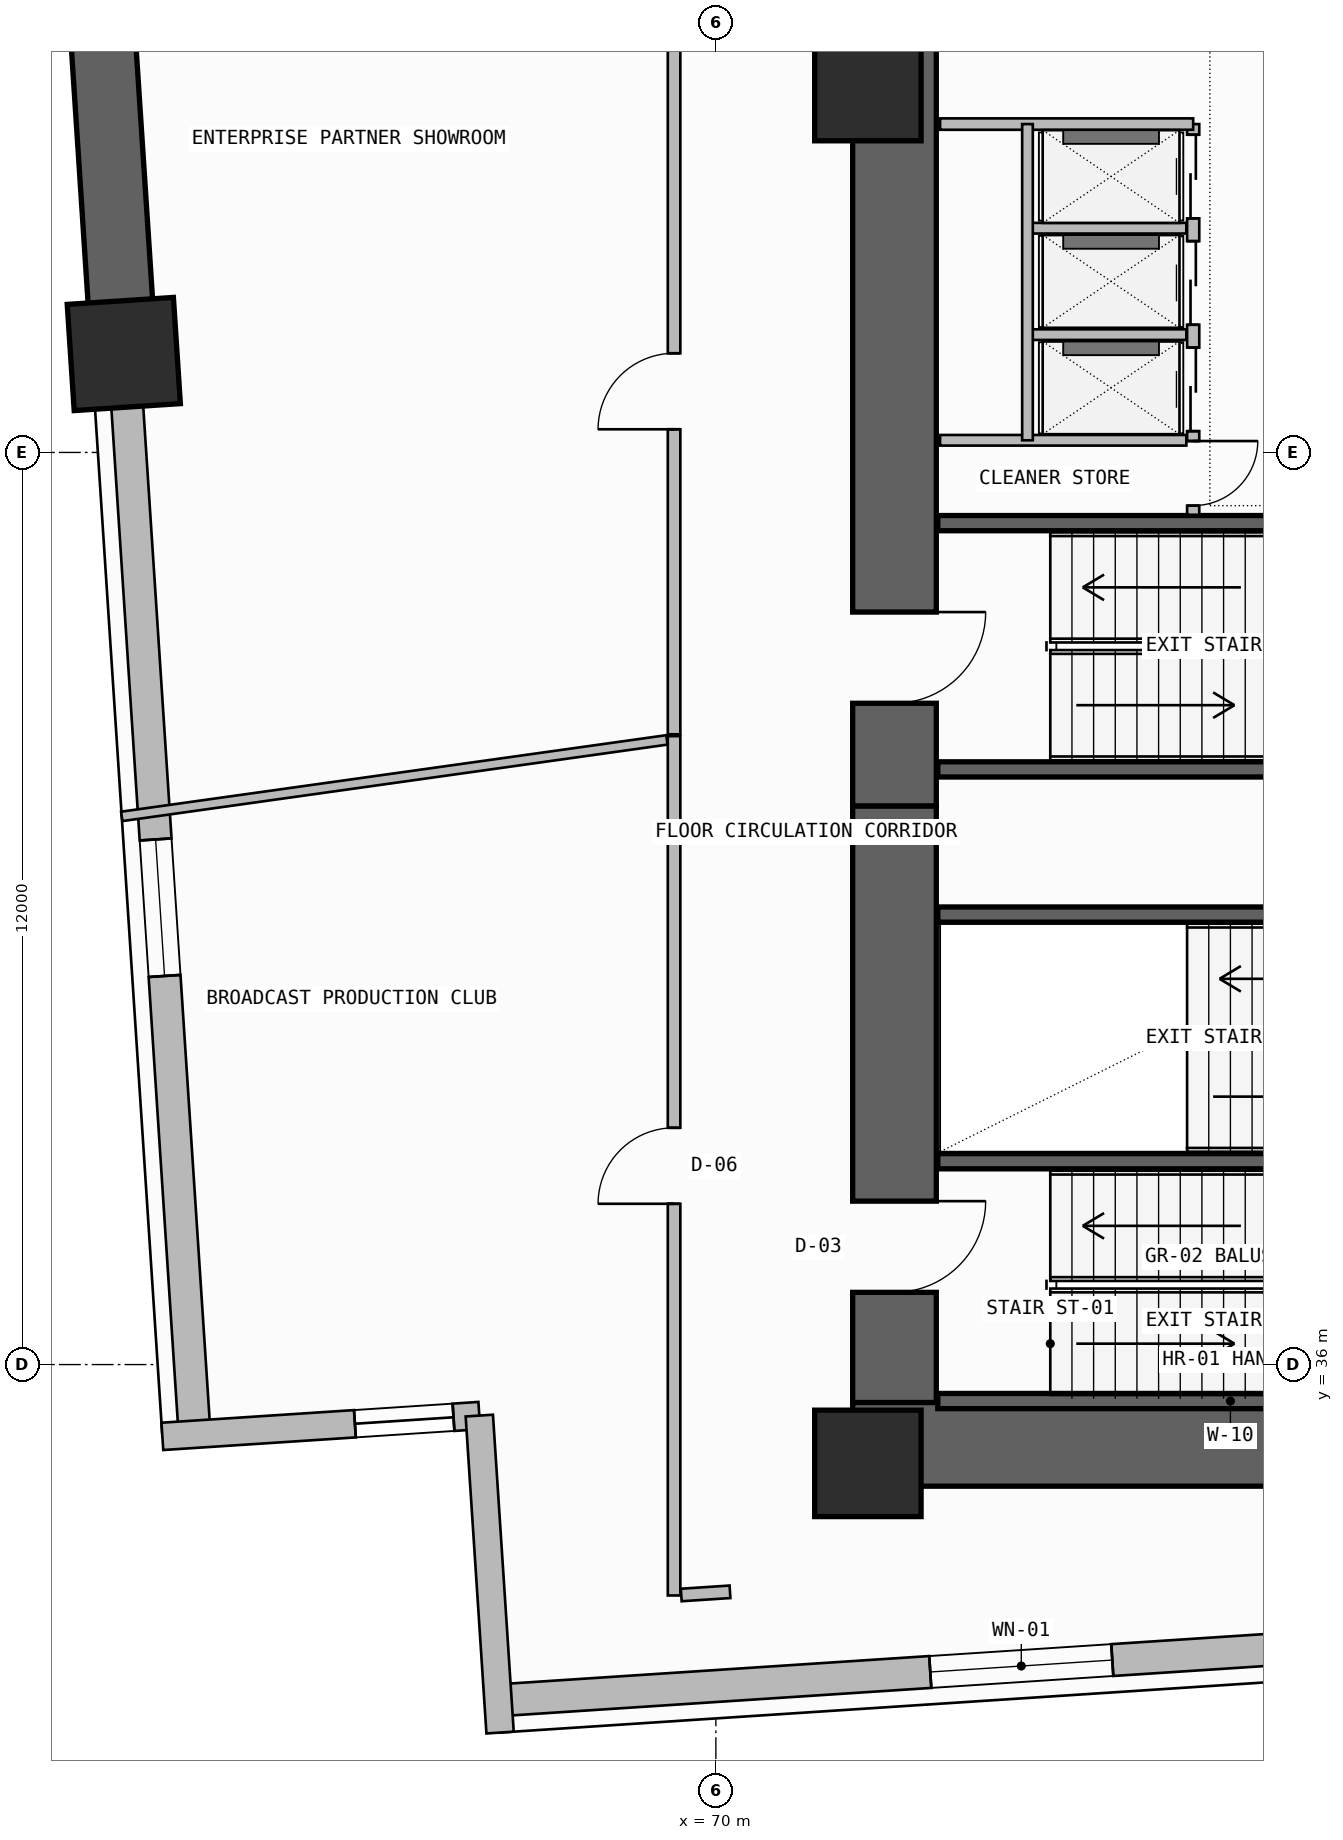
"""IFC4 building model, lengths in metres.
Left out: names, types, materials, properties, quantities, classifications, styles, units other than length and angle.
Written with IfcOpenShell. Run it as: python <this file> out.ifc"""

import sys

from ifc_helpers import new_model, si_unit, direction, frame, frame_2d, origin, origin_2d, place, context, subcontext, project, spatial, rectangle, extrude, element, fill, save


model = new_model("IFC4")
c1 = context("Model", 3, precision=1e-05, world=origin(), true_north=direction((0.0, 1.0)))
c2 = subcontext(c1, "Body", "Model", "MODEL_VIEW")
j1 = project(units=[si_unit("LENGTHUNIT", "METRE"), si_unit("PLANEANGLEUNIT", "RADIAN")], contexts=[c1])
p1 = place(None, origin())
s1 = spatial("IfcSite", under=j1, at=p1, CompositionType="ELEMENT")
p2 = place(p1, origin())
s2 = spatial("IfcBuilding", under=s1, at=p2, CompositionType="ELEMENT")
p3 = place(p2, frame((0.0, 0.0, 74.1)))
s3 = spatial("IfcBuildingStorey", under=s2, at=p3, CompositionType="ELEMENT", Elevation=74.1)
p4 = place(p3, frame((72.35, 35.5, -0.26), z_axis=(0.0, 0.0, 1.0), x_axis=(0.0, 1.0, 0.0)))
e1 = element("IfcWall", 1, at=p4, inside=s3, PredefinedType="SHEAR", context=c2, shape_type="SweptSolid", body=[
    extrude(rectangle(XDim=7.85, YDim=1.1, at=frame_2d((3.925, 0.0))), origin(), (0.0, 0.0, 1.0), 3.6),
])
p5 = place(p4, frame((1.45, 0.0, 0.26)))
e2 = element("IfcOpeningElement", 2, at=p5, cuts=e1, PredefinedType="OPENING", context=c2, shape_type="SweptSolid", body=[
    extrude(rectangle(XDim=1.2, YDim=2.2, at=frame_2d((0.6, 1.1))), frame((0.0, 0.56, 0.0), z_axis=(0.0, -1.0, 0.0), x_axis=(1.0, 0.0, 0.0)), (0.0, 0.0, 1.0), 1.12),
])
p6 = place(p3, frame((71.8, 34.95, -0.26), z_axis=(0.0, 0.0, 1.0), x_axis=(1.0, 0.0, 0.0)))
e3 = element("IfcWall", 3, at=p6, inside=s3, PredefinedType="SHEAR", context=c2, shape_type="SweptSolid", body=[
    extrude(rectangle(XDim=14.3, YDim=1.1, at=frame_2d((7.15, 0.0))), origin(), (0.0, 0.0, 1.0), 3.6),
])
p7 = place(p3, frame((72.35, 43.35, -0.26), z_axis=(0.0, 0.0, 1.0), x_axis=(0.0, 1.0, 0.0)))
e4 = element("IfcWall", 4, at=p7, inside=s3, PredefinedType="SHEAR", context=c2, shape_type="SweptSolid", body=[
    extrude(rectangle(XDim=12.7, YDim=1.1, at=frame_2d((6.35, 0.0))), origin(), (0.0, 0.0, 1.0), 3.6),
])
p8 = place(p7, frame((1.35, 0.0, 0.26)))
e5 = element("IfcOpeningElement", 5, at=p8, cuts=e4, PredefinedType="OPENING", context=c2, shape_type="SweptSolid", body=[
    extrude(rectangle(XDim=1.2, YDim=2.2, at=frame_2d((0.6, 1.1))), frame((0.0, 0.56, 0.0), z_axis=(0.0, -1.0, 0.0), x_axis=(1.0, 0.0, 0.0)), (0.0, 0.0, 1.0), 1.12),
])
for number, where, z_axis, x_axis in (
    (6, (72.0, 34.7, 0.0), (0.0, 0.0, 1.0), (1.0, 0.0, 0.0)),
    (7, (72.0, 52.8, 0.0), (0.0, 0.0, 1.0), (1.0, 0.0, 0.0)),
    (8, (62.21, 49.295, 0.0), (0.0, 0.0, 1.0), (-0.065, 0.998, 0.0)),
):
    element("IfcColumn", number, at=place(p3, frame(where, z_axis=z_axis, x_axis=x_axis)), inside=s3, PredefinedType="COLUMN", context=c2, shape_type="SweptSolid", body=[
        extrude(rectangle(XDim=1.4, YDim=1.4, at=origin_2d()), origin(), (0.0, 0.0, 1.0), 3.6),
    ])
p9 = place(p3, frame((67.133, 31.583, 0.0), z_axis=(0.0, 0.0, 1.0), x_axis=(0.997859040617, 0.065401338356, 0.0)))
e9 = element("IfcWall", 9, at=p9, inside=s3, PredefinedType="SOLIDWALL", context=c2, shape_type="SweptSolid", body=[
    extrude(rectangle(XDim=17.862, YDim=0.42, at=frame_2d((8.931, 0.0))), origin(), (0.0, 0.0, 1.0), 2.325),
])
p10 = place(p9, frame((5.7, 0.0, 1.2)))
e10 = element("IfcOpeningElement", 10, at=p10, cuts=e9, PredefinedType="OPENING", context=c2, shape_type="SweptSolid", body=[
    extrude(rectangle(XDim=2.4, YDim=0.9, at=frame_2d((1.2, 0.45))), frame((0.0, 0.22, 0.0), z_axis=(0.0, -1.0, 0.0), x_axis=(1.0, 0.0, 0.0)), (0.0, 0.0, 1.0), 0.44),
])
p11 = place(p3, frame((60.785, 71.031, -0.26), z_axis=(0.0, 0.0, 1.0), x_axis=(0.065409824833, -0.997858484363, 0.0)))
e11 = element("IfcWall", 11, at=p11, inside=s3, PredefinedType="SHEAR", context=c2, shape_type="SweptSolid", body=[
    extrude(rectangle(XDim=21.783, YDim=0.85, at=frame_2d((10.891, 0.0))), origin(), (0.0, 0.0, 1.0), 3.6),
])
p12 = place(p11, frame((2.2, 0.0, 1.2)))
e12 = element("IfcOpeningElement", 12, at=p12, cuts=e11, PredefinedType="OPENING", context=c2, shape_type="SweptSolid", body=[
    extrude(rectangle(XDim=1.8, YDim=0.9, at=frame_2d((0.9, 0.45))), frame((0.0, 0.435, 0.0), z_axis=(0.0, -1.0, 0.0), x_axis=(1.0, 0.0, 0.0)), (0.0, 0.0, 1.0), 0.87),
])
p13 = place(p3, frame((62.21, 49.295, 0.0), z_axis=(0.0, 0.0, 1.0), x_axis=(0.065396027757, -0.997859388668, 0.0)))
e13 = element("IfcWall", 13, at=p13, inside=s3, PredefinedType="SOLIDWALL", context=c2, shape_type="SweptSolid", body=[
    extrude(rectangle(XDim=14.242, YDim=0.42, at=frame_2d((7.121, 0.0))), origin(), (0.0, 0.0, 1.0), 2.325),
])
p14 = place(p13, frame((6.4, 0.0, 1.2)))
e14 = element("IfcOpeningElement", 14, at=p14, cuts=e13, PredefinedType="OPENING", context=c2, shape_type="SweptSolid", body=[
    extrude(rectangle(XDim=1.8, YDim=0.9, at=frame_2d((0.9, 0.45))), frame((0.0, 0.22, 0.0), z_axis=(0.0, -1.0, 0.0), x_axis=(1.0, 0.0, 0.0)), (0.0, 0.0, 1.0), 0.44),
])
p15 = place(p3, frame((62.718, 35.055, 0.0), z_axis=(0.0, 0.0, 1.0), x_axis=(0.997860761953, 0.065375069826, 0.0)))
e15 = element("IfcWall", 15, at=p15, inside=s3, PredefinedType="SOLIDWALL", context=c2, shape_type="SweptSolid", body=[
    extrude(rectangle(XDim=4.179, YDim=0.36, at=frame_2d((2.089, 0.0))), origin(), (0.0, 0.0, 1.0), 3.34),
])
p16 = place(p15, frame((2.539, 0.0, 0.45)))
e16 = element("IfcOpeningElement", 16, at=p16, cuts=e15, PredefinedType="OPENING", context=c2, shape_type="SweptSolid", body=[
    extrude(rectangle(XDim=1.3, YDim=2.4, at=frame_2d((0.65, 1.2))), frame((0.0, 0.19, 0.0), z_axis=(0.0, -1.0, 0.0), x_axis=(1.0, 0.0, 0.0)), (0.0, 0.0, 1.0), 0.38),
])
p17 = place(p3, frame((66.887, 35.329, 0.0), z_axis=(0.0, 0.0, 1.0), x_axis=(0.065433242561, -0.99785694905, 0.0)))
e17 = element("IfcWall", 17, at=p17, inside=s3, PredefinedType="SOLIDWALL", context=c2, shape_type="SweptSolid", body=[
    extrude(rectangle(XDim=4.179, YDim=0.36, at=frame_2d((2.089, 0.0))), origin(), (0.0, 0.0, 1.0), 3.34),
])
for number, where, z_axis, x_axis in (
    (18, (72.92, 35.52, -0.26), (0.0, 0.0, 1.0), (1.0, 0.0, 0.0)),
    (19, (72.92, 38.675, -0.26), (0.0, 0.0, 1.0), (1.0, 0.0, 0.0)),
):
    element("IfcWall", number, at=place(p3, frame(where, z_axis=z_axis, x_axis=x_axis)), inside=s3, PredefinedType="SOLIDWALL", context=c2, shape_type="SweptSolid", body=[
        extrude(rectangle(XDim=7.7, YDim=0.2, at=frame_2d((3.85, 0.0))), origin(), (0.0, 0.0, 1.0), 3.6),
    ])
p18 = place(p3, frame((72.92, 41.92, -0.26), z_axis=(0.0, 0.0, 1.0), x_axis=(1.0, 0.0, 0.0)))
e20 = element("IfcWall", 20, at=p18, inside=s3, PredefinedType="SOLIDWALL", context=c2, shape_type="SweptSolid", body=[
    extrude(rectangle(XDim=7.58, YDim=0.2, at=frame_2d((3.79, 0.0))), origin(), (0.0, 0.0, 1.0), 3.6),
])
for number, where, z_axis, x_axis in (
    (21, (72.92, 43.83, -0.26), (0.0, 0.0, 1.0), (1.0, 0.0, 0.0)),
    (22, (72.92, 47.07, -0.26), (0.0, 0.0, 1.0), (1.0, 0.0, 0.0)),
):
    element("IfcWall", number, at=place(p3, frame(where, z_axis=z_axis, x_axis=x_axis)), inside=s3, PredefinedType="SOLIDWALL", context=c2, shape_type="SweptSolid", body=[
        extrude(rectangle(XDim=7.7, YDim=0.2, at=frame_2d((3.85, 0.0))), origin(), (0.0, 0.0, 1.0), 3.6),
    ])
p19 = place(p3, frame((76.28, 47.18, 0.0), z_axis=(0.0, 0.0, 1.0), x_axis=(0.0, 1.0, 0.0)))
e23 = element("IfcWall", 23, at=p19, inside=s3, PredefinedType="SOLIDWALL", context=c2, shape_type="SweptSolid", body=[
    extrude(rectangle(XDim=5.14, YDim=0.16, at=frame_2d((2.57, 0.0))), origin(), (0.0, 0.0, 1.0), 3.34),
])
p20 = place(p19, frame((1.1, 0.0, 0.0)))
e24 = element("IfcOpeningElement", 24, at=p20, cuts=e23, PredefinedType="OPENING", context=c2, shape_type="SweptSolid", body=[
    extrude(rectangle(XDim=1.1, YDim=2.25, at=frame_2d((0.55, 1.125))), frame((0.0, 0.09, 0.0), z_axis=(0.0, -1.0, 0.0), x_axis=(1.0, 0.0, 0.0)), (0.0, 0.0, 1.0), 0.18),
])
p21 = place(p19, frame((2.5, 0.0, 0.0)))
e25 = element("IfcOpeningElement", 25, at=p21, cuts=e23, PredefinedType="OPENING", context=c2, shape_type="SweptSolid", body=[
    extrude(rectangle(XDim=1.1, YDim=2.25, at=frame_2d((0.55, 1.125))), frame((0.0, 0.09, 0.0), z_axis=(0.0, -1.0, 0.0), x_axis=(1.0, 0.0, 0.0)), (0.0, 0.0, 1.0), 0.18),
])
p22 = place(p19, frame((3.9, 0.0, 0.0)))
e26 = element("IfcOpeningElement", 26, at=p22, cuts=e23, PredefinedType="OPENING", context=c2, shape_type="SweptSolid", body=[
    extrude(rectangle(XDim=1.1, YDim=2.25, at=frame_2d((0.55, 1.125))), frame((0.0, 0.09, 0.0), z_axis=(0.0, -1.0, 0.0), x_axis=(1.0, 0.0, 0.0)), (0.0, 0.0, 1.0), 0.18),
])
p23 = place(p19, frame((0.12, 0.0, 0.0)))
e27 = element("IfcOpeningElement", 27, at=p23, cuts=e23, PredefinedType="OPENING", context=c2, shape_type="SweptSolid", body=[
    extrude(rectangle(XDim=0.85, YDim=2.05, at=frame_2d((0.425, 1.025))), frame((0.0, 0.09, 0.0), z_axis=(0.0, -1.0, 0.0), x_axis=(1.0, 0.0, 0.0)), (0.0, 0.0, 1.0), 0.18),
])
p24 = place(p3, frame((72.95, 52.32, 0.0), z_axis=(0.0, 0.0, 1.0), x_axis=(1.0, 0.0, 0.0)))
e28 = element("IfcWall", 28, at=p24, inside=s3, PredefinedType="SOLIDWALL", context=c2, shape_type="SweptSolid", body=[
    extrude(rectangle(XDim=3.33, YDim=0.15, at=frame_2d((1.665, 0.0))), origin(), (0.0, 0.0, 1.0), 3.34),
])
p25 = place(p3, frame((72.95, 48.16, 0.0), z_axis=(0.0, 0.0, 1.0), x_axis=(1.0, 0.0, 0.0)))
e29 = element("IfcWall", 29, at=p25, inside=s3, PredefinedType="PLUMBINGWALL", context=c2, shape_type="SweptSolid", body=[
    extrude(rectangle(XDim=3.24, YDim=0.14, at=frame_2d((1.62, 0.0))), origin(), (0.0, 0.0, 1.0), 3.34),
])
for number, where, z_axis, x_axis in (
    (30, (74.15, 49.55, 0.0), (0.0, 0.0, 1.0), (1.0, 0.0, 0.0)),
    (31, (74.15, 50.95, 0.0), (0.0, 0.0, 1.0), (1.0, 0.0, 0.0)),
):
    element("IfcWall", number, at=place(p3, frame(where, z_axis=z_axis, x_axis=x_axis)), inside=s3, PredefinedType="PLUMBINGWALL", context=c2, shape_type="SweptSolid", body=[
        extrude(rectangle(XDim=2.04, YDim=0.14, at=frame_2d((1.02, 0.0))), origin(), (0.0, 0.0, 1.0), 3.34),
    ])
p26 = place(p3, frame((74.1, 48.16, 0.0), z_axis=(0.0, 0.0, 1.0), x_axis=(0.0, 1.0, 0.0)))
e32 = element("IfcWall", 32, at=p26, inside=s3, PredefinedType="PLUMBINGWALL", context=c2, shape_type="SweptSolid", body=[
    extrude(rectangle(XDim=4.16, YDim=0.14, at=frame_2d((2.08, 0.0))), origin(), (0.0, 0.0, 1.0), 3.34),
])
p27 = place(p3, frame((69.45, 44.268, 0.0), z_axis=(0.0, 0.0, 1.0), x_axis=(0.0, -1.0, 0.0)))
e33 = element("IfcWall", 33, at=p27, inside=s3, PredefinedType="PARTITIONING", context=c2, shape_type="SweptSolid", body=[
    extrude(rectangle(XDim=11.306, YDim=0.165, at=frame_2d((5.653, 0.0))), origin(), (0.0, 0.0, 1.0), 3.34),
])
p28 = place(p27, frame((5.153, 0.0, 0.0)))
e34 = element("IfcOpeningElement", 34, at=p28, cuts=e33, PredefinedType="OPENING", context=c2, shape_type="SweptSolid", body=[
    extrude(rectangle(XDim=1.0, YDim=2.2, at=frame_2d((0.5, 1.1))), frame((0.0, 0.093, 0.0), z_axis=(0.0, -1.0, 0.0), x_axis=(1.0, 0.0, 0.0)), (0.0, 0.0, 1.0), 0.185),
])
p29 = place(p3, frame((69.544, 32.969, 0.0), z_axis=(0.0, 0.0, 1.0), x_axis=(0.997863449428, 0.065334036278, 0.0)))
e35 = element("IfcWall", 35, at=p29, inside=s3, PredefinedType="PARTITIONING", context=c2, shape_type="SweptSolid", body=[
    extrude(rectangle(XDim=0.643, YDim=0.165, at=frame_2d((0.321, 0.0))), origin(), (0.0, 0.0, 1.0), 3.34),
])
p30 = place(p3, frame((62.183, 43.212, 0.0), z_axis=(0.0, 0.0, 1.0), x_axis=(0.990300324939, 0.138943392879, 0.0)))
e36 = element("IfcWall", 36, at=p30, inside=s3, PredefinedType="PARTITIONING", context=c2, shape_type="SweptSolid", body=[
    extrude(rectangle(XDim=7.243, YDim=0.125, at=frame_2d((3.622, 0.0))), origin(), (0.0, 0.0, 1.0), 3.34),
])
p31 = place(p3, frame((69.45, 53.317, 0.0), z_axis=(0.0, 0.0, 1.0), x_axis=(0.0, -1.0, 0.0)))
e37 = element("IfcWall", 37, at=p31, inside=s3, PredefinedType="PARTITIONING", context=c2, shape_type="SweptSolid", body=[
    extrude(rectangle(XDim=9.025, YDim=0.165, at=frame_2d((4.513, 0.0))), origin(), (0.0, 0.0, 1.0), 2.725),
])
p32 = place(p31, frame((4.013, 0.0, 0.0)))
e38 = element("IfcOpeningElement", 38, at=p32, cuts=e37, PredefinedType="OPENING", context=c2, shape_type="SweptSolid", body=[
    extrude(rectangle(XDim=1.0, YDim=2.2, at=frame_2d((0.5, 1.1))), frame((0.0, 0.093, 0.0), z_axis=(0.0, -1.0, 0.0), x_axis=(1.0, 0.0, 0.0)), (0.0, 0.0, 1.0), 0.185),
])
p33 = place(p10, origin())
e39 = element("IfcWindow", 39, at=p33, inside=s3, PartitioningType="SINGLE_PANEL", PredefinedType="WINDOW", context=c2, shape_type="SweptSolid", body=[
    extrude(rectangle(XDim=2.4, YDim=0.9, at=frame_2d((1.2, 0.45))), frame((0.0, 0.03, 0.0), z_axis=(0.0, -1.0, 0.0), x_axis=(1.0, 0.0, 0.0)), (0.0, 0.0, 1.0), 0.06),
])
fill(e10, e39)
p34 = place(p14, origin())
e40 = element("IfcWindow", 40, at=p34, inside=s3, PartitioningType="SINGLE_PANEL", PredefinedType="WINDOW", context=c2, shape_type="SweptSolid", body=[
    extrude(rectangle(XDim=1.8, YDim=0.9, at=frame_2d((0.9, 0.45))), frame((0.0, 0.03, 0.0), z_axis=(0.0, -1.0, 0.0), x_axis=(1.0, 0.0, 0.0)), (0.0, 0.0, 1.0), 0.06),
])
fill(e14, e40)
p35 = place(p16, origin())
e41 = element("IfcWindow", 41, at=p35, inside=s3, PartitioningType="SINGLE_PANEL", PredefinedType="WINDOW", context=c2, shape_type="SweptSolid", body=[
    extrude(rectangle(XDim=1.3, YDim=2.4, at=frame_2d((0.65, 1.2))), frame((0.0, 0.03, 0.0), z_axis=(0.0, -1.0, 0.0), x_axis=(1.0, 0.0, 0.0)), (0.0, 0.0, 1.0), 0.06),
])
fill(e16, e41)
p36 = place(p5, frame((1.2, 0.0, 0.0), z_axis=(0.0, 0.0, 1.0), x_axis=(-1.0, 0.0, 0.0)))
e42 = element("IfcDoor", 42, at=p36, inside=s3, OperationType="SINGLE_SWING_LEFT", PredefinedType="USERDEFINED", context=c2, shape_type="SweptSolid", body=[
    extrude(rectangle(XDim=1.2, YDim=2.2, at=frame_2d((0.6, 1.1))), frame((0.0, 0.025, 0.0), z_axis=(0.0, -1.0, 0.0), x_axis=(1.0, 0.0, 0.0)), (0.0, 0.0, 1.0), 0.05),
])
fill(e2, e42)
p37 = place(p8, frame((1.2, 0.0, 0.0), z_axis=(0.0, 0.0, 1.0), x_axis=(-1.0, 0.0, 0.0)))
e43 = element("IfcDoor", 43, at=p37, inside=s3, OperationType="SINGLE_SWING_LEFT", PredefinedType="USERDEFINED", context=c2, shape_type="SweptSolid", body=[
    extrude(rectangle(XDim=1.2, YDim=2.2, at=frame_2d((0.6, 1.1))), frame((0.0, 0.025, 0.0), z_axis=(0.0, -1.0, 0.0), x_axis=(1.0, 0.0, 0.0)), (0.0, 0.0, 1.0), 0.05),
])
fill(e5, e43)
p38 = place(p20, origin())
e44 = element("IfcDoor", 44, at=p38, inside=s3, OperationType="DOUBLE_DOOR_SLIDING", PredefinedType="DOOR", context=c2, shape_type="SweptSolid", body=[
    extrude(rectangle(XDim=1.1, YDim=2.25, at=frame_2d((0.55, 1.125))), frame((0.0, 0.025, 0.0), z_axis=(0.0, -1.0, 0.0), x_axis=(1.0, 0.0, 0.0)), (0.0, 0.0, 1.0), 0.05),
])
fill(e24, e44)
p39 = place(p21, origin())
e45 = element("IfcDoor", 45, at=p39, inside=s3, OperationType="DOUBLE_DOOR_SLIDING", PredefinedType="DOOR", context=c2, shape_type="SweptSolid", body=[
    extrude(rectangle(XDim=1.1, YDim=2.25, at=frame_2d((0.55, 1.125))), frame((0.0, 0.025, 0.0), z_axis=(0.0, -1.0, 0.0), x_axis=(1.0, 0.0, 0.0)), (0.0, 0.0, 1.0), 0.05),
])
fill(e25, e45)
p40 = place(p22, origin())
e46 = element("IfcDoor", 46, at=p40, inside=s3, OperationType="DOUBLE_DOOR_SLIDING", PredefinedType="DOOR", context=c2, shape_type="SweptSolid", body=[
    extrude(rectangle(XDim=1.1, YDim=2.25, at=frame_2d((0.55, 1.125))), frame((0.0, 0.025, 0.0), z_axis=(0.0, -1.0, 0.0), x_axis=(1.0, 0.0, 0.0)), (0.0, 0.0, 1.0), 0.05),
])
fill(e26, e46)
p41 = place(p23, frame((0.85, 0.0, 0.0), z_axis=(0.0, 0.0, 1.0), x_axis=(-1.0, 0.0, 0.0)))
e47 = element("IfcDoor", 47, at=p41, inside=s3, OperationType="SINGLE_SWING_LEFT", PredefinedType="DOOR", context=c2, shape_type="SweptSolid", body=[
    extrude(rectangle(XDim=0.85, YDim=2.05, at=frame_2d((0.425, 1.025))), frame((0.0, 0.025, 0.0), z_axis=(0.0, -1.0, 0.0), x_axis=(1.0, 0.0, 0.0)), (0.0, 0.0, 1.0), 0.05),
])
fill(e27, e47)
p42 = place(p28, frame((1.0, 0.0, 0.0), z_axis=(0.0, 0.0, 1.0), x_axis=(-1.0, 0.0, 0.0)))
e48 = element("IfcDoor", 48, at=p42, inside=s3, OperationType="SINGLE_SWING_LEFT", PredefinedType="DOOR", context=c2, shape_type="SweptSolid", body=[
    extrude(rectangle(XDim=1.0, YDim=2.2, at=frame_2d((0.5, 1.1))), frame((0.0, 0.025, 0.0), z_axis=(0.0, -1.0, 0.0), x_axis=(1.0, 0.0, 0.0)), (0.0, 0.0, 1.0), 0.05),
])
fill(e34, e48)
p43 = place(p32, frame((1.0, 0.0, 0.0), z_axis=(0.0, 0.0, 1.0), x_axis=(-1.0, 0.0, 0.0)))
e49 = element("IfcDoor", 49, at=p43, inside=s3, OperationType="SINGLE_SWING_LEFT", PredefinedType="DOOR", context=c2, shape_type="SweptSolid", body=[
    extrude(rectangle(XDim=1.0, YDim=2.2, at=frame_2d((0.5, 1.1))), frame((0.0, 0.025, 0.0), z_axis=(0.0, -1.0, 0.0), x_axis=(1.0, 0.0, 0.0)), (0.0, 0.0, 1.0), 0.05),
])
fill(e38, e49)
save(model, sys.argv[1])
